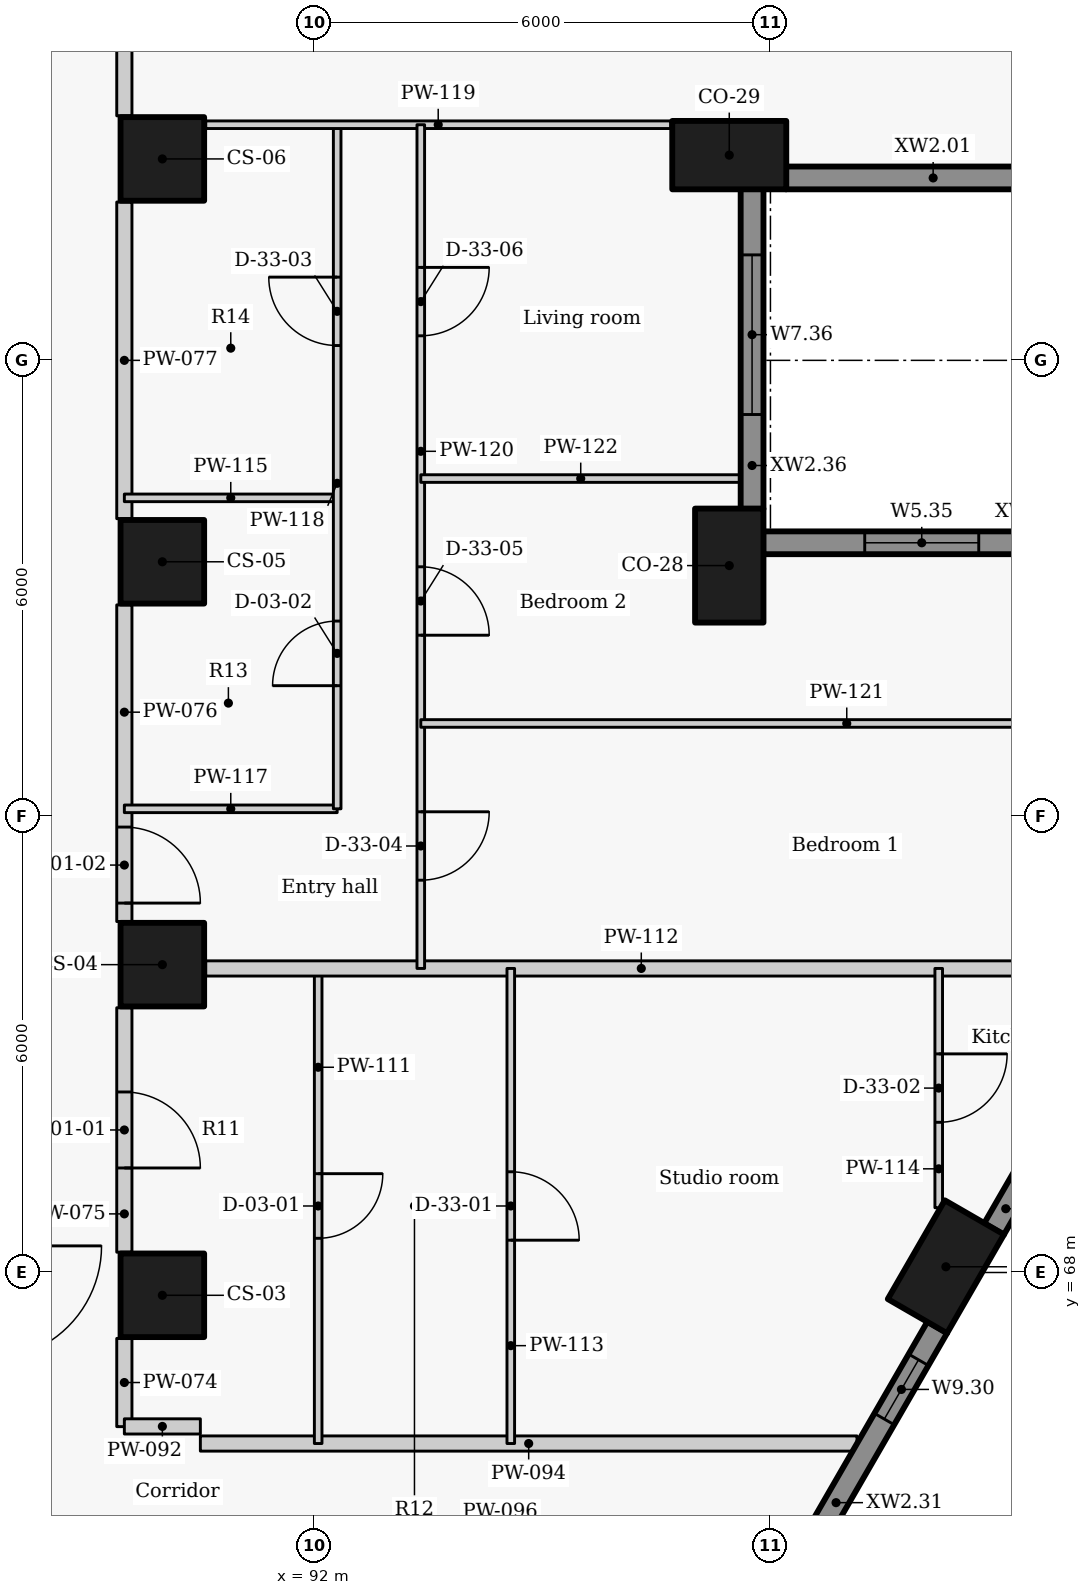
"""IFC4 building model, lengths in metres.
Left out: names, types, materials, properties, quantities, classifications, styles, units other than length and angle.
Written with IfcOpenShell. Run it as: python <this file> out.ifc"""

import sys

from ifc_helpers import new_model, si_unit, direction, frame, frame_2d, origin, origin_2d, place, context, subcontext, project, spatial, rectangle, extrude, element, fill, save


model = new_model("IFC4")
c1 = context("Model", 3, precision=1e-05, world=origin(), true_north=direction((0.0, 1.0)))
c2 = subcontext(c1, "Body", "Model", "MODEL_VIEW")
j1 = project(units=[si_unit("LENGTHUNIT", "METRE"), si_unit("PLANEANGLEUNIT", "RADIAN")], contexts=[c1])
p1 = place(None, origin())
s1 = spatial("IfcSite", under=j1, at=p1, CompositionType="ELEMENT")
p2 = place(p1, origin())
s2 = spatial("IfcBuilding", under=s1, at=p2, CompositionType="ELEMENT")
p3 = place(p2, frame((0.0, 0.0, 51.3)))
s3 = spatial("IfcBuildingStorey", under=s2, at=p3, CompositionType="ELEMENT", Elevation=51.3)
for number, where, z_axis, x_axis in (
    (1, (100.308, 68.075, 0.0), (0.0, 0.0, 1.0), (0.5, 0.866, 0.0)),
    (2, (97.458, 77.3, 0.0), (0.0, 0.0, 1.0), (0.0, 1.0, 0.0)),
    (3, (97.458, 82.7, 0.0), (0.0, 0.0, 1.0), (1.0, 0.0, 0.0)),
):
    element("IfcColumn", number, at=place(p3, frame(where, z_axis=z_axis, x_axis=x_axis)), inside=s3, PredefinedType="COLUMN", context=c2, shape_type="SweptSolid", body=[
        extrude(rectangle(XDim=1.5, YDim=0.9, at=origin_2d()), origin(), (0.0, 0.0, 1.0), 3.3),
    ])
for number, where, z_axis, x_axis in (
    (4, (90.0, 67.7, 0.0), (0.0, 0.0, 1.0), (0.0, 1.0, 0.0)),
    (5, (90.0, 72.05, 0.0), (0.0, 0.0, 1.0), (0.0, 1.0, 0.0)),
    (6, (90.0, 77.35, 0.0), (0.0, 0.0, 1.0), (0.0, 1.0, 0.0)),
    (7, (90.0, 82.65, 0.0), (0.0, 0.0, 1.0), (0.0, 1.0, 0.0)),
):
    element("IfcColumn", number, at=place(p3, frame(where, z_axis=z_axis, x_axis=x_axis)), inside=s3, PredefinedType="COLUMN", context=c2, shape_type="SweptSolid", body=[
        extrude(rectangle(XDim=1.1, YDim=1.1, at=origin_2d()), origin(), (0.0, 0.0, 1.0), 3.3),
    ])
p4 = place(p3, frame((98.204, 82.4, 0.0), z_axis=(0.0, 0.0, 1.0), x_axis=(1.0, 0.0, 0.0)))
e8 = element("IfcWall", 8, at=p4, inside=s3, PredefinedType="SOLIDWALL", context=c2, shape_type="SweptSolid", body=[
    extrude(rectangle(XDim=3.873, YDim=0.3, at=frame_2d((1.936, 0.0))), origin(), (0.0, 0.0, 1.0), 2.425),
])
p5 = place(p3, frame((98.278, 63.959, 0.0), z_axis=(0.0, 0.0, 1.0), x_axis=(0.500001735503, 0.866024401789, 0.0)))
e9 = element("IfcWall", 9, at=p5, inside=s3, PredefinedType="SOLIDWALL", context=c2, shape_type="SweptSolid", body=[
    extrude(rectangle(XDim=3.834, YDim=0.3, at=frame_2d((1.917, 0.0))), origin(), (0.0, 0.0, 1.0), 2.425),
])
p6 = place(p5, frame((2.44, 0.0, 0.9)))
e10 = element("IfcOpeningElement", 10, at=p6, cuts=e9, PredefinedType="OPENING", context=c2, shape_type="SweptSolid", body=[
    extrude(rectangle(XDim=0.9, YDim=1.1, at=frame_2d((0.45, 0.55))), frame((0.0, 0.16, 0.0), z_axis=(0.0, -1.0, 0.0), x_axis=(1.0, 0.0, 0.0)), (0.0, 0.0, 1.0), 0.32),
])
p7 = place(p3, frame((100.941, 68.571, 0.0), z_axis=(0.0, 0.0, 1.0), x_axis=(0.499977402622, 0.866038449993, 0.0)))
e11 = element("IfcWall", 11, at=p7, inside=s3, PredefinedType="SOLIDWALL", context=c2, shape_type="SweptSolid", body=[
    extrude(rectangle(XDim=3.537, YDim=0.3, at=frame_2d((1.769, 0.0))), origin(), (0.0, 0.0, 1.0), 2.425),
])
p8 = place(p7, frame((0.719, 0.0, 0.9)))
e12 = element("IfcOpeningElement", 12, at=p8, cuts=e11, PredefinedType="OPENING", context=c2, shape_type="SweptSolid", body=[
    extrude(rectangle(XDim=2.1, YDim=1.1, at=frame_2d((1.05, 0.55))), frame((0.0, 0.16, 0.0), z_axis=(0.0, -1.0, 0.0), x_axis=(1.0, 0.0, 0.0)), (0.0, 0.0, 1.0), 0.32),
])
p9 = place(p3, frame((102.077, 77.6, 0.0), z_axis=(0.0, 0.0, 1.0), x_axis=(-1.0, 0.0, 0.0)))
e13 = element("IfcWall", 13, at=p9, inside=s3, PredefinedType="SOLIDWALL", context=c2, shape_type="SweptSolid", body=[
    extrude(rectangle(XDim=4.173, YDim=0.3, at=frame_2d((2.086, 0.0))), origin(), (0.0, 0.0, 1.0), 2.425),
])
p10 = place(p9, frame((1.336, 0.0, 0.9)))
e14 = element("IfcOpeningElement", 14, at=p10, cuts=e13, PredefinedType="OPENING", context=c2, shape_type="SweptSolid", body=[
    extrude(rectangle(XDim=1.5, YDim=1.1, at=frame_2d((0.75, 0.55))), frame((0.0, 0.16, 0.0), z_axis=(0.0, -1.0, 0.0), x_axis=(1.0, 0.0, 0.0)), (0.0, 0.0, 1.0), 0.32),
])
p11 = place(p3, frame((97.758, 78.046, 0.0), z_axis=(0.0, 0.0, 1.0), x_axis=(0.0, 1.0, 0.0)))
e15 = element("IfcWall", 15, at=p11, inside=s3, PredefinedType="SOLIDWALL", context=c2, shape_type="SweptSolid", body=[
    extrude(rectangle(XDim=4.208, YDim=0.3, at=frame_2d((2.104, 0.0))), origin(), (0.0, 0.0, 1.0), 2.425),
])
p12 = place(p11, frame((1.242, 0.0, 0.9)))
e16 = element("IfcOpeningElement", 16, at=p12, cuts=e15, PredefinedType="OPENING", context=c2, shape_type="SweptSolid", body=[
    extrude(rectangle(XDim=2.1, YDim=1.1, at=frame_2d((1.05, 0.55))), frame((0.0, 0.16, 0.0), z_axis=(0.0, -1.0, 0.0), x_axis=(1.0, 0.0, 0.0)), (0.0, 0.0, 1.0), 0.32),
])
p13 = place(p3, frame((89.5, 65.972, 0.0), z_axis=(0.0, 0.0, 1.0), x_axis=(0.0, 1.0, 0.0)))
e17 = element("IfcWall", 17, at=p13, inside=s3, PredefinedType="PARTITIONING", context=c2, shape_type="SweptSolid", body=[
    extrude(rectangle(XDim=1.161, YDim=0.2, at=frame_2d((0.581, 0.0))), origin(), (0.0, 0.0, 1.0), 3.025),
])
p14 = place(p3, frame((89.5, 71.483, 0.0), z_axis=(0.0, 0.0, 1.0), x_axis=(0.0, -1.0, 0.0)))
e18 = element("IfcWall", 18, at=p14, inside=s3, PredefinedType="PARTITIONING", context=c2, shape_type="SweptSolid", body=[
    extrude(rectangle(XDim=3.216, YDim=0.2, at=frame_2d((1.608, 0.0))), origin(), (0.0, 0.0, 1.0), 3.025),
])
p15 = place(p14, frame((1.108, 0.0, 0.0)))
e19 = element("IfcOpeningElement", 19, at=p15, cuts=e18, PredefinedType="OPENING", context=c2, shape_type="SweptSolid", body=[
    extrude(rectangle(XDim=1.0, YDim=2.1, at=frame_2d((0.5, 1.05))), frame((0.0, 0.11, 0.0), z_axis=(0.0, -1.0, 0.0), x_axis=(1.0, 0.0, 0.0)), (0.0, 0.0, 1.0), 0.22),
])
p16 = place(p3, frame((89.5, 76.783, 0.0), z_axis=(0.0, 0.0, 1.0), x_axis=(0.0, -1.0, 0.0)))
e20 = element("IfcWall", 20, at=p16, inside=s3, PredefinedType="PARTITIONING", context=c2, shape_type="SweptSolid", body=[
    extrude(rectangle(XDim=4.166, YDim=0.2, at=frame_2d((2.083, 0.0))), origin(), (0.0, 0.0, 1.0), 3.025),
])
p17 = place(p16, frame((2.923, 0.0, 0.0)))
e21 = element("IfcOpeningElement", 21, at=p17, cuts=e20, PredefinedType="OPENING", context=c2, shape_type="SweptSolid", body=[
    extrude(rectangle(XDim=1.0, YDim=2.1, at=frame_2d((0.5, 1.05))), frame((0.0, 0.11, 0.0), z_axis=(0.0, -1.0, 0.0), x_axis=(1.0, 0.0, 0.0)), (0.0, 0.0, 1.0), 0.22),
])
p18 = place(p3, frame((89.5, 77.917, 0.0), z_axis=(0.0, 0.0, 1.0), x_axis=(0.0, 1.0, 0.0)))
e22 = element("IfcWall", 22, at=p18, inside=s3, PredefinedType="PARTITIONING", context=c2, shape_type="SweptSolid", body=[
    extrude(rectangle(XDim=4.166, YDim=0.2, at=frame_2d((2.083, 0.0))), origin(), (0.0, 0.0, 1.0), 3.025),
])
p19 = place(p3, frame((89.5, 87.383, 0.0), z_axis=(0.0, 0.0, 1.0), x_axis=(0.0, -1.0, 0.0)))
e23 = element("IfcWall", 23, at=p19, inside=s3, PredefinedType="PARTITIONING", context=c2, shape_type="SweptSolid", body=[
    extrude(rectangle(XDim=4.166, YDim=0.2, at=frame_2d((2.083, 0.0))), origin(), (0.0, 0.0, 1.0), 3.025),
])
p20 = place(p19, frame((1.583, 0.0, 0.0)))
e24 = element("IfcOpeningElement", 24, at=p20, cuts=e23, PredefinedType="OPENING", context=c2, shape_type="SweptSolid", body=[
    extrude(rectangle(XDim=1.0, YDim=2.1, at=frame_2d((0.5, 1.05))), frame((0.0, 0.11, 0.0), z_axis=(0.0, -1.0, 0.0), x_axis=(1.0, 0.0, 0.0)), (0.0, 0.0, 1.0), 0.22),
])
p21 = place(p3, frame((89.5, 65.975, 0.0), z_axis=(0.0, 0.0, 1.0), x_axis=(1.0, 0.0, 0.0)))
e25 = element("IfcWall", 25, at=p21, inside=s3, PredefinedType="PARTITIONING", context=c2, shape_type="SweptSolid", body=[
    extrude(rectangle(XDim=1.0, YDim=0.2, at=frame_2d((0.5, 0.0))), origin(), (0.0, 0.0, 1.0), 2.505),
])
p22 = place(p3, frame((90.5, 65.75, 0.0), z_axis=(0.0, 0.0, 1.0), x_axis=(1.0, 0.0, 0.0)))
e26 = element("IfcWall", 26, at=p22, inside=s3, PredefinedType="PARTITIONING", context=c2, shape_type="SweptSolid", body=[
    extrude(rectangle(XDim=8.639, YDim=0.2, at=frame_2d((4.32, 0.0))), origin(), (0.0, 0.0, 1.0), 2.405),
])
p23 = place(p3, frame((92.05, 72.0, 0.0), z_axis=(0.0, 0.0, 1.0), x_axis=(0.0, -1.0, 0.0)))
e27 = element("IfcWall", 27, at=p23, inside=s3, PredefinedType="PARTITIONING", context=c2, shape_type="SweptSolid", body=[
    extrude(rectangle(XDim=6.25, YDim=0.1, at=frame_2d((3.125, 0.0))), origin(), (0.0, 0.0, 1.0), 3.025),
])
p24 = place(p23, frame((2.7, 0.0, 0.0)))
e28 = element("IfcOpeningElement", 28, at=p24, cuts=e27, PredefinedType="OPENING", context=c2, shape_type="SweptSolid", body=[
    extrude(rectangle(XDim=0.85, YDim=2.1, at=frame_2d((0.425, 1.05))), frame((0.0, 0.06, 0.0), z_axis=(0.0, -1.0, 0.0), x_axis=(1.0, 0.0, 0.0)), (0.0, 0.0, 1.0), 0.12),
])
p25 = place(p3, frame((90.57, 72.0, 0.0), z_axis=(0.0, 0.0, 1.0), x_axis=(1.0, 0.0, 0.0)))
e29 = element("IfcWall", 29, at=p25, inside=s3, PredefinedType="PARTITIONING", context=c2, shape_type="SweptSolid", body=[
    extrude(rectangle(XDim=11.462, YDim=0.2, at=frame_2d((5.731, 0.0))), origin(), (0.0, 0.0, 1.0), 3.025),
])
p26 = place(p3, frame((94.584, 72.0, 0.0), z_axis=(0.0, 0.0, 1.0), x_axis=(0.0, -1.0, 0.0)))
e30 = element("IfcWall", 30, at=p26, inside=s3, PredefinedType="PARTITIONING", context=c2, shape_type="SweptSolid", body=[
    extrude(rectangle(XDim=6.25, YDim=0.1, at=frame_2d((3.125, 0.0))), origin(), (0.0, 0.0, 1.0), 3.025),
])
p27 = place(p26, frame((2.675, 0.0, 0.0)))
e31 = element("IfcOpeningElement", 31, at=p27, cuts=e30, PredefinedType="OPENING", context=c2, shape_type="SweptSolid", body=[
    extrude(rectangle(XDim=0.9, YDim=2.1, at=frame_2d((0.45, 1.05))), frame((0.0, 0.06, 0.0), z_axis=(0.0, -1.0, 0.0), x_axis=(1.0, 0.0, 0.0)), (0.0, 0.0, 1.0), 0.12),
])
p28 = place(p3, frame((100.214, 72.0, 0.0), z_axis=(0.0, 0.0, 1.0), x_axis=(0.0, -1.0, 0.0)))
e32 = element("IfcWall", 32, at=p28, inside=s3, PredefinedType="PARTITIONING", context=c2, shape_type="SweptSolid", body=[
    extrude(rectangle(XDim=3.148, YDim=0.1, at=frame_2d((1.574, 0.0))), origin(), (0.0, 0.0, 1.0), 3.025),
])
p29 = place(p28, frame((1.124, 0.0, 0.0)))
e33 = element("IfcOpeningElement", 33, at=p29, cuts=e32, PredefinedType="OPENING", context=c2, shape_type="SweptSolid", body=[
    extrude(rectangle(XDim=0.9, YDim=2.1, at=frame_2d((0.45, 1.05))), frame((0.0, 0.06, 0.0), z_axis=(0.0, -1.0, 0.0), x_axis=(1.0, 0.0, 0.0)), (0.0, 0.0, 1.0), 0.12),
])
for number, where, z_axis, x_axis in (
    (34, (89.5, 78.191, 0.0), (0.0, 0.0, 1.0), (1.0, 0.0, 0.0)),
    (35, (89.5, 74.1, 0.0), (0.0, 0.0, 1.0), (1.0, 0.0, 0.0)),
):
    element("IfcWall", number, at=place(p3, frame(where, z_axis=z_axis, x_axis=x_axis)), inside=s3, PredefinedType="PARTITIONING", context=c2, shape_type="SweptSolid", body=[
        extrude(rectangle(XDim=2.8, YDim=0.1, at=frame_2d((1.4, 0.0))), origin(), (0.0, 0.0, 1.0), 2.505),
    ])
p30 = place(p3, frame((92.3, 74.1, 0.0), z_axis=(0.0, 0.0, 1.0), x_axis=(0.0, 1.0, 0.0)))
e36 = element("IfcWall", 36, at=p30, inside=s3, PredefinedType="PARTITIONING", context=c2, shape_type="SweptSolid", body=[
    extrude(rectangle(XDim=9.0, YDim=0.1, at=frame_2d((4.5, 0.0))), origin(), (0.0, 0.0, 1.0), 3.025),
])
p31 = place(p30, frame((1.62, 0.0, 0.0)))
e37 = element("IfcOpeningElement", 37, at=p31, cuts=e36, PredefinedType="OPENING", context=c2, shape_type="SweptSolid", body=[
    extrude(rectangle(XDim=0.85, YDim=2.1, at=frame_2d((0.425, 1.05))), frame((0.0, 0.06, 0.0), z_axis=(0.0, -1.0, 0.0), x_axis=(1.0, 0.0, 0.0)), (0.0, 0.0, 1.0), 0.12),
])
p32 = place(p30, frame((6.095, 0.0, 0.0)))
e38 = element("IfcOpeningElement", 38, at=p32, cuts=e36, PredefinedType="OPENING", context=c2, shape_type="SweptSolid", body=[
    extrude(rectangle(XDim=0.9, YDim=2.1, at=frame_2d((0.45, 1.05))), frame((0.0, 0.06, 0.0), z_axis=(0.0, -1.0, 0.0), x_axis=(1.0, 0.0, 0.0)), (0.0, 0.0, 1.0), 0.12),
])
p33 = place(p3, frame((90.57, 83.1, 0.0), z_axis=(0.0, 0.0, 1.0), x_axis=(1.0, 0.0, 0.0)))
e39 = element("IfcWall", 39, at=p33, inside=s3, PredefinedType="PARTITIONING", context=c2, shape_type="SweptSolid", body=[
    extrude(rectangle(XDim=6.118, YDim=0.1, at=frame_2d((3.059, 0.0))), origin(), (0.0, 0.0, 1.0), 3.025),
])
p34 = place(p3, frame((93.4, 83.1, 0.0), z_axis=(0.0, 0.0, 1.0), x_axis=(0.0, -1.0, 0.0)))
e40 = element("IfcWall", 40, at=p34, inside=s3, PredefinedType="PARTITIONING", context=c2, shape_type="SweptSolid", body=[
    extrude(rectangle(XDim=11.1, YDim=0.1, at=frame_2d((5.55, 0.0))), origin(), (0.0, 0.0, 1.0), 3.025),
])
p35 = place(p34, frame((9.039, 0.0, 0.0)))
e41 = element("IfcOpeningElement", 41, at=p35, cuts=e40, PredefinedType="OPENING", context=c2, shape_type="SweptSolid", body=[
    extrude(rectangle(XDim=0.9, YDim=2.1, at=frame_2d((0.45, 1.05))), frame((0.0, 0.06, 0.0), z_axis=(0.0, -1.0, 0.0), x_axis=(1.0, 0.0, 0.0)), (0.0, 0.0, 1.0), 0.12),
])
p36 = place(p34, frame((5.816, 0.0, 0.0)))
e42 = element("IfcOpeningElement", 42, at=p36, cuts=e40, PredefinedType="OPENING", context=c2, shape_type="SweptSolid", body=[
    extrude(rectangle(XDim=0.9, YDim=2.1, at=frame_2d((0.45, 1.05))), frame((0.0, 0.06, 0.0), z_axis=(0.0, -1.0, 0.0), x_axis=(1.0, 0.0, 0.0)), (0.0, 0.0, 1.0), 0.12),
])
p37 = place(p34, frame((1.877, 0.0, 0.0)))
e43 = element("IfcOpeningElement", 43, at=p37, cuts=e40, PredefinedType="OPENING", context=c2, shape_type="SweptSolid", body=[
    extrude(rectangle(XDim=0.9, YDim=2.1, at=frame_2d((0.45, 1.05))), frame((0.0, 0.06, 0.0), z_axis=(0.0, -1.0, 0.0), x_axis=(1.0, 0.0, 0.0)), (0.0, 0.0, 1.0), 0.12),
])
p38 = place(p3, frame((93.4, 75.223, 0.0), z_axis=(0.0, 0.0, 1.0), x_axis=(1.0, 0.0, 0.0)))
e44 = element("IfcWall", 44, at=p38, inside=s3, PredefinedType="PARTITIONING", context=c2, shape_type="SweptSolid", body=[
    extrude(rectangle(XDim=11.208, YDim=0.1, at=frame_2d((5.604, 0.0))), origin(), (0.0, 0.0, 1.0), 2.405),
])
p39 = place(p3, frame((93.4, 78.445, 0.0), z_axis=(0.0, 0.0, 1.0), x_axis=(1.0, 0.0, 0.0)))
e45 = element("IfcWall", 45, at=p39, inside=s3, PredefinedType="PARTITIONING", context=c2, shape_type="SweptSolid", body=[
    extrude(rectangle(XDim=4.208, YDim=0.1, at=frame_2d((2.104, 0.0))), origin(), (0.0, 0.0, 1.0), 2.405),
])
p40 = place(p6, origin())
e46 = element("IfcWindow", 46, at=p40, inside=s3, PartitioningType="SINGLE_PANEL", PredefinedType="WINDOW", context=c2, shape_type="SweptSolid", body=[
    extrude(rectangle(XDim=0.9, YDim=1.1, at=frame_2d((0.45, 0.55))), frame((0.0, 0.03, 0.0), z_axis=(0.0, -1.0, 0.0), x_axis=(1.0, 0.0, 0.0)), (0.0, 0.0, 1.0), 0.06),
])
fill(e10, e46)
p41 = place(p10, origin())
e47 = element("IfcWindow", 47, at=p41, inside=s3, PartitioningType="SINGLE_PANEL", PredefinedType="WINDOW", context=c2, shape_type="SweptSolid", body=[
    extrude(rectangle(XDim=1.5, YDim=1.1, at=frame_2d((0.75, 0.55))), frame((0.0, 0.03, 0.0), z_axis=(0.0, -1.0, 0.0), x_axis=(1.0, 0.0, 0.0)), (0.0, 0.0, 1.0), 0.06),
])
fill(e14, e47)
p42 = place(p12, origin())
e48 = element("IfcWindow", 48, at=p42, inside=s3, PartitioningType="SINGLE_PANEL", PredefinedType="WINDOW", context=c2, shape_type="SweptSolid", body=[
    extrude(rectangle(XDim=2.1, YDim=1.1, at=frame_2d((1.05, 0.55))), frame((0.0, 0.03, 0.0), z_axis=(0.0, -1.0, 0.0), x_axis=(1.0, 0.0, 0.0)), (0.0, 0.0, 1.0), 0.06),
])
fill(e16, e48)
p43 = place(p15, origin())
e49 = element("IfcDoor", 49, at=p43, inside=s3, OperationType="SINGLE_SWING_RIGHT", PredefinedType="DOOR", context=c2, shape_type="SweptSolid", body=[
    extrude(rectangle(XDim=1.0, YDim=2.1, at=frame_2d((0.5, 1.05))), frame((0.0, 0.025, 0.0), z_axis=(0.0, -1.0, 0.0), x_axis=(1.0, 0.0, 0.0)), (0.0, 0.0, 1.0), 0.05),
])
fill(e19, e49)
p44 = place(p24, origin())
e50 = element("IfcDoor", 50, at=p44, inside=s3, OperationType="SINGLE_SWING_LEFT", PredefinedType="DOOR", context=c2, shape_type="SweptSolid", body=[
    extrude(rectangle(XDim=0.85, YDim=2.1, at=frame_2d((0.425, 1.05))), frame((0.0, 0.025, 0.0), z_axis=(0.0, -1.0, 0.0), x_axis=(1.0, 0.0, 0.0)), (0.0, 0.0, 1.0), 0.05),
])
fill(e28, e50)
p45 = place(p27, origin())
e51 = element("IfcDoor", 51, at=p45, inside=s3, OperationType="SINGLE_SWING_RIGHT", PredefinedType="DOOR", context=c2, shape_type="SweptSolid", body=[
    extrude(rectangle(XDim=0.9, YDim=2.1, at=frame_2d((0.45, 1.05))), frame((0.0, 0.025, 0.0), z_axis=(0.0, -1.0, 0.0), x_axis=(1.0, 0.0, 0.0)), (0.0, 0.0, 1.0), 0.05),
])
fill(e31, e51)
p46 = place(p29, origin())
e52 = element("IfcDoor", 52, at=p46, inside=s3, OperationType="SINGLE_SWING_LEFT", PredefinedType="DOOR", context=c2, shape_type="SweptSolid", body=[
    extrude(rectangle(XDim=0.9, YDim=2.1, at=frame_2d((0.45, 1.05))), frame((0.0, 0.025, 0.0), z_axis=(0.0, -1.0, 0.0), x_axis=(1.0, 0.0, 0.0)), (0.0, 0.0, 1.0), 0.05),
])
fill(e33, e52)
p47 = place(p17, origin())
e53 = element("IfcDoor", 53, at=p47, inside=s3, OperationType="SINGLE_SWING_RIGHT", PredefinedType="DOOR", context=c2, shape_type="SweptSolid", body=[
    extrude(rectangle(XDim=1.0, YDim=2.1, at=frame_2d((0.5, 1.05))), frame((0.0, 0.025, 0.0), z_axis=(0.0, -1.0, 0.0), x_axis=(1.0, 0.0, 0.0)), (0.0, 0.0, 1.0), 0.05),
])
fill(e21, e53)
p48 = place(p31, origin())
e54 = element("IfcDoor", 54, at=p48, inside=s3, OperationType="SINGLE_SWING_LEFT", PredefinedType="DOOR", context=c2, shape_type="SweptSolid", body=[
    extrude(rectangle(XDim=0.85, YDim=2.1, at=frame_2d((0.425, 1.05))), frame((0.0, 0.025, 0.0), z_axis=(0.0, -1.0, 0.0), x_axis=(1.0, 0.0, 0.0)), (0.0, 0.0, 1.0), 0.05),
])
fill(e37, e54)
p49 = place(p32, origin())
e55 = element("IfcDoor", 55, at=p49, inside=s3, OperationType="SINGLE_SWING_RIGHT", PredefinedType="DOOR", context=c2, shape_type="SweptSolid", body=[
    extrude(rectangle(XDim=0.9, YDim=2.1, at=frame_2d((0.45, 1.05))), frame((0.0, 0.025, 0.0), z_axis=(0.0, -1.0, 0.0), x_axis=(1.0, 0.0, 0.0)), (0.0, 0.0, 1.0), 0.05),
])
fill(e38, e55)
p50 = place(p35, origin())
e56 = element("IfcDoor", 56, at=p50, inside=s3, OperationType="SINGLE_SWING_LEFT", PredefinedType="DOOR", context=c2, shape_type="SweptSolid", body=[
    extrude(rectangle(XDim=0.9, YDim=2.1, at=frame_2d((0.45, 1.05))), frame((0.0, 0.025, 0.0), z_axis=(0.0, -1.0, 0.0), x_axis=(1.0, 0.0, 0.0)), (0.0, 0.0, 1.0), 0.05),
])
fill(e41, e56)
p51 = place(p36, origin())
e57 = element("IfcDoor", 57, at=p51, inside=s3, OperationType="SINGLE_SWING_RIGHT", PredefinedType="DOOR", context=c2, shape_type="SweptSolid", body=[
    extrude(rectangle(XDim=0.9, YDim=2.1, at=frame_2d((0.45, 1.05))), frame((0.0, 0.025, 0.0), z_axis=(0.0, -1.0, 0.0), x_axis=(1.0, 0.0, 0.0)), (0.0, 0.0, 1.0), 0.05),
])
fill(e42, e57)
p52 = place(p37, origin())
e58 = element("IfcDoor", 58, at=p52, inside=s3, OperationType="SINGLE_SWING_LEFT", PredefinedType="DOOR", context=c2, shape_type="SweptSolid", body=[
    extrude(rectangle(XDim=0.9, YDim=2.1, at=frame_2d((0.45, 1.05))), frame((0.0, 0.025, 0.0), z_axis=(0.0, -1.0, 0.0), x_axis=(1.0, 0.0, 0.0)), (0.0, 0.0, 1.0), 0.05),
])
fill(e43, e58)
save(model, sys.argv[1])
